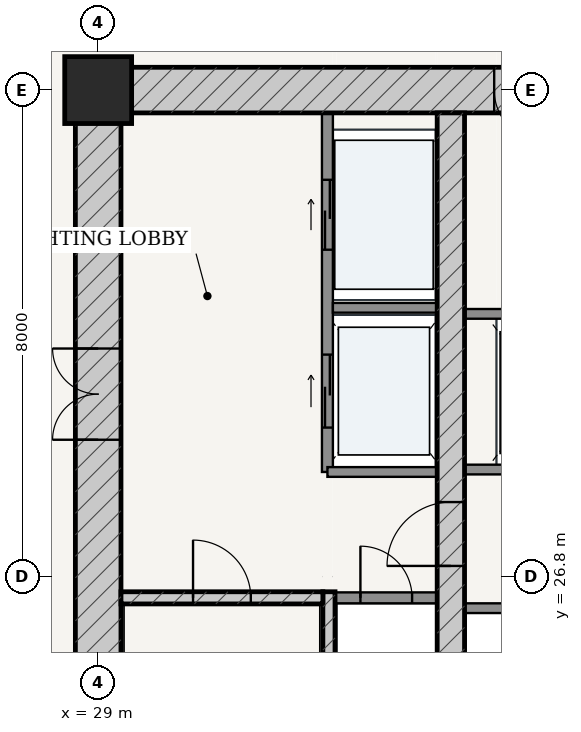
"""IFC4 building model, lengths in metres.
Left out: names, types, materials, properties, quantities, classifications, styles, units other than length and angle.
Written with IfcOpenShell. Run it as: python <this file> out.ifc"""

import sys

from ifc_helpers import new_model, si_unit, direction, frame, frame_2d, origin, origin_2d, place, context, subcontext, project, spatial, rectangle, extrude, source, transform, mapped, element, fill, save


model = new_model("IFC4")
c1 = context("Model", 3, precision=1e-05, world=origin(), true_north=direction((-0.2419218956, 0.970295726276)))
c2 = subcontext(c1, "Body", "Model", "MODEL_VIEW")
j1 = project(units=[si_unit("LENGTHUNIT", "METRE"), si_unit("PLANEANGLEUNIT", "RADIAN")], contexts=[c1])
p1 = place(None, origin())
s1 = spatial("IfcSite", under=j1, at=p1, CompositionType="ELEMENT")
p2 = place(p1, origin())
s2 = spatial("IfcBuilding", under=s1, at=p2, CompositionType="ELEMENT")
p3 = place(p2, frame((0.0, 0.0, 52.8)))
s3 = spatial("IfcBuildingStorey", under=s2, at=p3, CompositionType="ELEMENT", Elevation=52.8)
p4 = place(p3, frame((29.0, 34.8, 0.0), z_axis=(0.0, 0.0, 1.0), x_axis=(1.0, 0.0, 0.0)))
e1 = element("IfcColumn", 1, at=p4, inside=s3, PredefinedType="COLUMN", context=c2, shape_type="SweptSolid", body=[
    extrude(rectangle(XDim=1.1, YDim=1.1, at=origin_2d()), origin(), (0.0, 0.0, 1.0), 3.6),
])
p5 = place(p3, frame((28.625, 34.8, 0.0), z_axis=(0.0, 0.0, 1.0), x_axis=(1.0, 0.0, 0.0)))
e2 = element("IfcWall", 2, at=p5, inside=s3, PredefinedType="SHEAR", context=c2, shape_type="SweptSolid", body=[
    extrude(rectangle(XDim=18.75, YDim=0.75, at=frame_2d((9.375, 0.0))), origin(), (0.0, 0.0, 1.0), 3.32),
])
p6 = place(p5, frame((6.887, 0.0, 0.0)))
e3 = element("IfcOpeningElement", 3, at=p6, cuts=e2, PredefinedType="OPENING", context=c2, shape_type="SweptSolid", body=[
    extrude(rectangle(XDim=0.85, YDim=2.1, at=frame_2d((0.425, 1.05))), frame((0.0, 0.385, 0.0), z_axis=(0.0, -1.0, 0.0), x_axis=(1.0, 0.0, 0.0)), (0.0, 0.0, 1.0), 0.77),
])
p7 = place(p5, frame((8.945, 0.0, 0.0)))
e4 = element("IfcOpeningElement", 4, at=p7, cuts=e2, PredefinedType="OPENING", context=c2, shape_type="SweptSolid", body=[
    extrude(rectangle(XDim=0.86, YDim=2.1, at=frame_2d((0.43, 1.05))), frame((0.0, 0.385, 0.0), z_axis=(0.0, -1.0, 0.0), x_axis=(1.0, 0.0, 0.0)), (0.0, 0.0, 1.0), 0.77),
])
p8 = place(p5, frame((11.012, 0.0, 0.0)))
e5 = element("IfcOpeningElement", 5, at=p8, cuts=e2, PredefinedType="OPENING", context=c2, shape_type="SweptSolid", body=[
    extrude(rectangle(XDim=0.85, YDim=2.1, at=frame_2d((0.425, 1.05))), frame((0.0, 0.385, 0.0), z_axis=(0.0, -1.0, 0.0), x_axis=(1.0, 0.0, 0.0)), (0.0, 0.0, 1.0), 0.77),
])
p9 = place(p3, frame((29.0, 19.175, 0.0), z_axis=(0.0, 0.0, 1.0), x_axis=(0.0, 1.0, 0.0)))
e6 = element("IfcWall", 6, at=p9, inside=s3, PredefinedType="SHEAR", context=c2, shape_type="SweptSolid", body=[
    extrude(rectangle(XDim=15.25, YDim=0.75, at=frame_2d((7.625, 0.0))), origin(), (0.0, 0.0, 1.0), 3.32),
])
p10 = place(p9, frame((9.875, 0.0, 0.0)))
e7 = element("IfcOpeningElement", 7, at=p10, cuts=e6, PredefinedType="OPENING", context=c2, shape_type="SweptSolid", body=[
    extrude(rectangle(XDim=1.5, YDim=2.2, at=frame_2d((0.75, 1.1))), frame((0.0, 0.385, 0.0), z_axis=(0.0, -1.0, 0.0), x_axis=(1.0, 0.0, 0.0)), (0.0, 0.0, 1.0), 0.77),
])
p11 = place(p3, frame((32.795, 19.175, 0.0), z_axis=(0.0, 0.0, 1.0), x_axis=(0.0, 1.0, 0.0)))
e8 = element("IfcWall", 8, at=p11, inside=s3, PredefinedType="SOLIDWALL", context=c2, shape_type="SweptSolid", body=[
    extrude(rectangle(XDim=7.375, YDim=0.2, at=frame_2d((3.688, 0.0))), origin(), (0.0, 0.0, 1.0), 3.32),
])
p12 = place(p3, frame((29.375, 26.45, 0.0), z_axis=(0.0, 0.0, 1.0), x_axis=(1.0, 0.0, 0.0)))
e9 = element("IfcWall", 9, at=p12, inside=s3, PredefinedType="SOLIDWALL", context=c2, shape_type="SweptSolid", body=[
    extrude(rectangle(XDim=3.32, YDim=0.2, at=frame_2d((1.66, 0.0))), origin(), (0.0, 0.0, 1.0), 3.32),
])
p13 = place(p12, frame((1.185, 0.0, 0.0)))
e10 = element("IfcOpeningElement", 10, at=p13, cuts=e9, PredefinedType="OPENING", context=c2, shape_type="SweptSolid", body=[
    extrude(rectangle(XDim=0.95, YDim=2.15, at=frame_2d((0.475, 1.075))), frame((0.0, 0.11, 0.0), z_axis=(0.0, -1.0, 0.0), x_axis=(1.0, 0.0, 0.0)), (0.0, 0.0, 1.0), 0.22),
])
p14 = place(p3, frame((34.8, 19.175, 0.0), z_axis=(0.0, 0.0, 1.0), x_axis=(0.0, 1.0, 0.0)))
e11 = element("IfcWall", 11, at=p14, inside=s3, PredefinedType="SHEAR", context=c2, shape_type="SweptSolid", body=[
    extrude(rectangle(XDim=15.25, YDim=0.45, at=frame_2d((7.625, 0.0))), origin(), (0.0, 0.0, 1.0), 3.32),
])
p15 = place(p14, frame((7.8, 0.0, 0.0)))
e12 = element("IfcOpeningElement", 12, at=p15, cuts=e11, PredefinedType="OPENING", context=c2, shape_type="SweptSolid", body=[
    extrude(rectangle(XDim=1.05, YDim=2.15, at=frame_2d((0.525, 1.075))), frame((0.0, 0.235, 0.0), z_axis=(0.0, -1.0, 0.0), x_axis=(1.0, 0.0, 0.0)), (0.0, 0.0, 1.0), 0.47),
])
p16 = place(p3, frame((32.9, 26.45, 0.0), z_axis=(0.0, 0.0, 1.0), x_axis=(1.0, 0.0, 0.0)))
e13 = element("IfcWall", 13, at=p16, inside=s3, PredefinedType="PARTITIONING", context=c2, shape_type="SweptSolid", body=[
    extrude(rectangle(XDim=1.675, YDim=0.18, at=frame_2d((0.837, 0.0))), origin(), (0.0, 0.0, 1.0), 3.32),
])
p17 = place(p16, frame((0.413, 0.0, 0.0)))
e14 = element("IfcOpeningElement", 14, at=p17, cuts=e13, PredefinedType="OPENING", context=c2, shape_type="SweptSolid", body=[
    extrude(rectangle(XDim=0.85, YDim=2.1, at=frame_2d((0.425, 1.05))), frame((0.0, 0.1, 0.0), z_axis=(0.0, -1.0, 0.0), x_axis=(1.0, 0.0, 0.0)), (0.0, 0.0, 1.0), 0.2),
])
p18 = place(p3, frame((32.77, 28.52, 0.0), z_axis=(0.0, 0.0, 1.0), x_axis=(0.0, 1.0, 0.0)))
e15 = element("IfcWall", 15, at=p18, inside=s3, PredefinedType="PARTITIONING", context=c2, shape_type="SweptSolid", body=[
    extrude(rectangle(XDim=5.905, YDim=0.18, at=frame_2d((2.953, 0.0))), origin(), (0.0, 0.0, 1.0), 3.32),
])
p19 = place(p18, frame((3.655, 0.0, 0.0)))
e16 = element("IfcOpeningElement", 16, at=p19, cuts=e15, PredefinedType="OPENING", context=c2, shape_type="SweptSolid", body=[
    extrude(rectangle(XDim=1.15, YDim=2.2, at=frame_2d((0.575, 1.1))), frame((0.0, 0.1, 0.0), z_axis=(0.0, -1.0, 0.0), x_axis=(1.0, 0.0, 0.0)), (0.0, 0.0, 1.0), 0.2),
])
p20 = place(p18, frame((0.73, 0.0, 0.0)))
e17 = element("IfcOpeningElement", 17, at=p20, cuts=e15, PredefinedType="OPENING", context=c2, shape_type="SweptSolid", body=[
    extrude(rectangle(XDim=1.2, YDim=2.25, at=frame_2d((0.6, 1.125))), frame((0.0, 0.1, 0.0), z_axis=(0.0, -1.0, 0.0), x_axis=(1.0, 0.0, 0.0)), (0.0, 0.0, 1.0), 0.2),
])
p21 = place(p3, frame((32.86, 31.22, 0.0), z_axis=(0.0, 0.0, 1.0), x_axis=(1.0, 0.0, 0.0)))
e18 = element("IfcWall", 18, at=p21, inside=s3, PredefinedType="PARTITIONING", context=c2, shape_type="SweptSolid", body=[
    extrude(rectangle(XDim=1.715, YDim=0.16, at=frame_2d((0.857, 0.0))), origin(), (0.0, 0.0, 1.0), 3.32),
])
p22 = place(p3, frame((32.77, 28.52, 0.0), z_axis=(0.0, 0.0, 1.0), x_axis=(1.0, 0.0, 0.0)))
e19 = element("IfcWall", 19, at=p22, inside=s3, PredefinedType="PARTITIONING", context=c2, shape_type="SweptSolid", body=[
    extrude(rectangle(XDim=1.805, YDim=0.16, at=frame_2d((0.902, 0.0))), origin(), (0.0, 0.0, 1.0), 3.32),
])
p23 = place(p3, frame((35.025, 28.56, 0.0), z_axis=(0.0, 0.0, 1.0), x_axis=(1.0, 0.0, 0.0)))
e20 = element("IfcWall", 20, at=p23, inside=s3, PredefinedType="PARTITIONING", context=c2, shape_type="SweptSolid", body=[
    extrude(rectangle(XDim=5.95, YDim=0.16, at=frame_2d((2.975, 0.0))), origin(), (0.0, 0.0, 1.0), 3.32),
])
p24 = place(p23, frame((0.76, 0.0, 0.0)))
e21 = element("IfcOpeningElement", 21, at=p24, cuts=e20, PredefinedType="OPENING", context=c2, shape_type="SweptSolid", body=[
    extrude(rectangle(XDim=1.1, YDim=2.2, at=frame_2d((0.55, 1.1))), frame((0.0, 0.09, 0.0), z_axis=(0.0, -1.0, 0.0), x_axis=(1.0, 0.0, 0.0)), (0.0, 0.0, 1.0), 0.18),
])
p25 = place(p23, frame((2.425, 0.0, 0.0)))
e22 = element("IfcOpeningElement", 22, at=p25, cuts=e20, PredefinedType="OPENING", context=c2, shape_type="SweptSolid", body=[
    extrude(rectangle(XDim=1.1, YDim=2.2, at=frame_2d((0.55, 1.1))), frame((0.0, 0.09, 0.0), z_axis=(0.0, -1.0, 0.0), x_axis=(1.0, 0.0, 0.0)), (0.0, 0.0, 1.0), 0.18),
])
p26 = place(p23, frame((4.09, 0.0, 0.0)))
e23 = element("IfcOpeningElement", 23, at=p26, cuts=e20, PredefinedType="OPENING", context=c2, shape_type="SweptSolid", body=[
    extrude(rectangle(XDim=1.1, YDim=2.2, at=frame_2d((0.55, 1.1))), frame((0.0, 0.09, 0.0), z_axis=(0.0, -1.0, 0.0), x_axis=(1.0, 0.0, 0.0)), (0.0, 0.0, 1.0), 0.18),
])
for number, where, z_axis, x_axis in (
    (24, (35.025, 31.12, 0.0), (0.0, 0.0, 1.0), (1.0, 0.0, 0.0)),
    (25, (35.025, 26.28, 0.0), (0.0, 0.0, 1.0), (1.0, 0.0, 0.0)),
):
    element("IfcWall", number, at=place(p3, frame(where, z_axis=z_axis, x_axis=x_axis)), inside=s3, PredefinedType="PARTITIONING", context=c2, shape_type="SweptSolid", body=[
        extrude(rectangle(XDim=5.95, YDim=0.16, at=frame_2d((2.975, 0.0))), origin(), (0.0, 0.0, 1.0), 3.32),
    ])
m1 = source(origin(), c2, "Body", "SweptSolid", [
    extrude(rectangle(XDim=1.5, YDim=2.2, at=frame_2d((0.75, 1.1))), frame((0.0, 0.025, 0.0), z_axis=(0.0, -1.0, 0.0), x_axis=(1.0, 0.0, 0.0)), (0.0, 0.0, 1.0), 0.05),
])
p27 = place(p10, origin())
e26 = element("IfcDoor", 26, at=p27, inside=s3, OperationType="DOUBLE_DOOR_SINGLE_SWING", PredefinedType="DOOR", context=c2, shape_type="MappedRepresentation", body=[
    mapped(m1, transform((0.0, 0.0, 0.0), scale=1.0)),
])
fill(e7, e26)
m2 = source(origin(), c2, "Body", "SweptSolid", [
    extrude(rectangle(XDim=1.05, YDim=2.15, at=frame_2d((0.525, 1.075))), frame((0.0, 0.025, 0.0), z_axis=(0.0, -1.0, 0.0), x_axis=(1.0, 0.0, 0.0)), (0.0, 0.0, 1.0), 0.05),
])
p28 = place(p15, origin())
e27 = element("IfcDoor", 27, at=p28, inside=s3, OperationType="SINGLE_SWING_LEFT", PredefinedType="DOOR", context=c2, shape_type="MappedRepresentation", body=[
    mapped(m2, transform((0.0, 0.0, 0.0), scale=1.0)),
])
fill(e12, e27)
m3 = source(origin(), c2, "Body", "SweptSolid", [
    extrude(rectangle(XDim=0.95, YDim=2.15, at=frame_2d((0.475, 1.075))), frame((0.0, 0.025, 0.0), z_axis=(0.0, -1.0, 0.0), x_axis=(1.0, 0.0, 0.0)), (0.0, 0.0, 1.0), 0.05),
])
p29 = place(p13, origin())
e28 = element("IfcDoor", 28, at=p29, inside=s3, OperationType="SINGLE_SWING_LEFT", PredefinedType="DOOR", context=c2, shape_type="MappedRepresentation", body=[
    mapped(m3, transform((0.0, 0.0, 0.0), scale=1.0)),
])
fill(e10, e28)
m4 = source(origin(), c2, "Body", "SweptSolid", [
    extrude(rectangle(XDim=0.85, YDim=2.1, at=frame_2d((0.425, 1.05))), frame((0.0, 0.025, 0.0), z_axis=(0.0, -1.0, 0.0), x_axis=(1.0, 0.0, 0.0)), (0.0, 0.0, 1.0), 0.05),
])
p30 = place(p17, origin())
e29 = element("IfcDoor", 29, at=p30, inside=s3, OperationType="SINGLE_SWING_LEFT", PredefinedType="DOOR", context=c2, shape_type="MappedRepresentation", body=[
    mapped(m4, transform((0.0, 0.0, 0.0), scale=1.0)),
])
fill(e14, e29)
p31 = place(p6, frame((0.85, 0.0, 0.0), z_axis=(0.0, 0.0, 1.0), x_axis=(-1.0, 0.0, 0.0)))
e30 = element("IfcDoor", 30, at=p31, inside=s3, OperationType="SINGLE_SWING_LEFT", PredefinedType="DOOR", context=c2, shape_type="MappedRepresentation", body=[
    mapped(m4, transform((0.0, 0.0, 0.0), scale=1.0)),
])
fill(e3, e30)
m5 = source(origin(), c2, "Body", "SweptSolid", [
    extrude(rectangle(XDim=1.15, YDim=2.2, at=frame_2d((0.575, 1.1))), frame((0.0, 0.025, 0.0), z_axis=(0.0, -1.0, 0.0), x_axis=(1.0, 0.0, 0.0)), (0.0, 0.0, 1.0), 0.05),
])
p32 = place(p19, origin())
e31 = element("IfcDoor", 31, at=p32, inside=s3, OperationType="DOUBLE_DOOR_SLIDING", PredefinedType="DOOR", context=c2, shape_type="MappedRepresentation", body=[
    mapped(m5, transform((0.0, 0.0, 0.0), scale=1.0)),
])
fill(e16, e31)
m6 = source(origin(), c2, "Body", "SweptSolid", [
    extrude(rectangle(XDim=1.2, YDim=2.25, at=frame_2d((0.6, 1.125))), frame((0.0, 0.025, 0.0), z_axis=(0.0, -1.0, 0.0), x_axis=(1.0, 0.0, 0.0)), (0.0, 0.0, 1.0), 0.05),
])
p33 = place(p20, origin())
e32 = element("IfcDoor", 32, at=p33, inside=s3, OperationType="DOUBLE_DOOR_SLIDING", PredefinedType="DOOR", context=c2, shape_type="MappedRepresentation", body=[
    mapped(m6, transform((0.0, 0.0, 0.0), scale=1.0)),
])
fill(e17, e32)
save(model, sys.argv[1])
